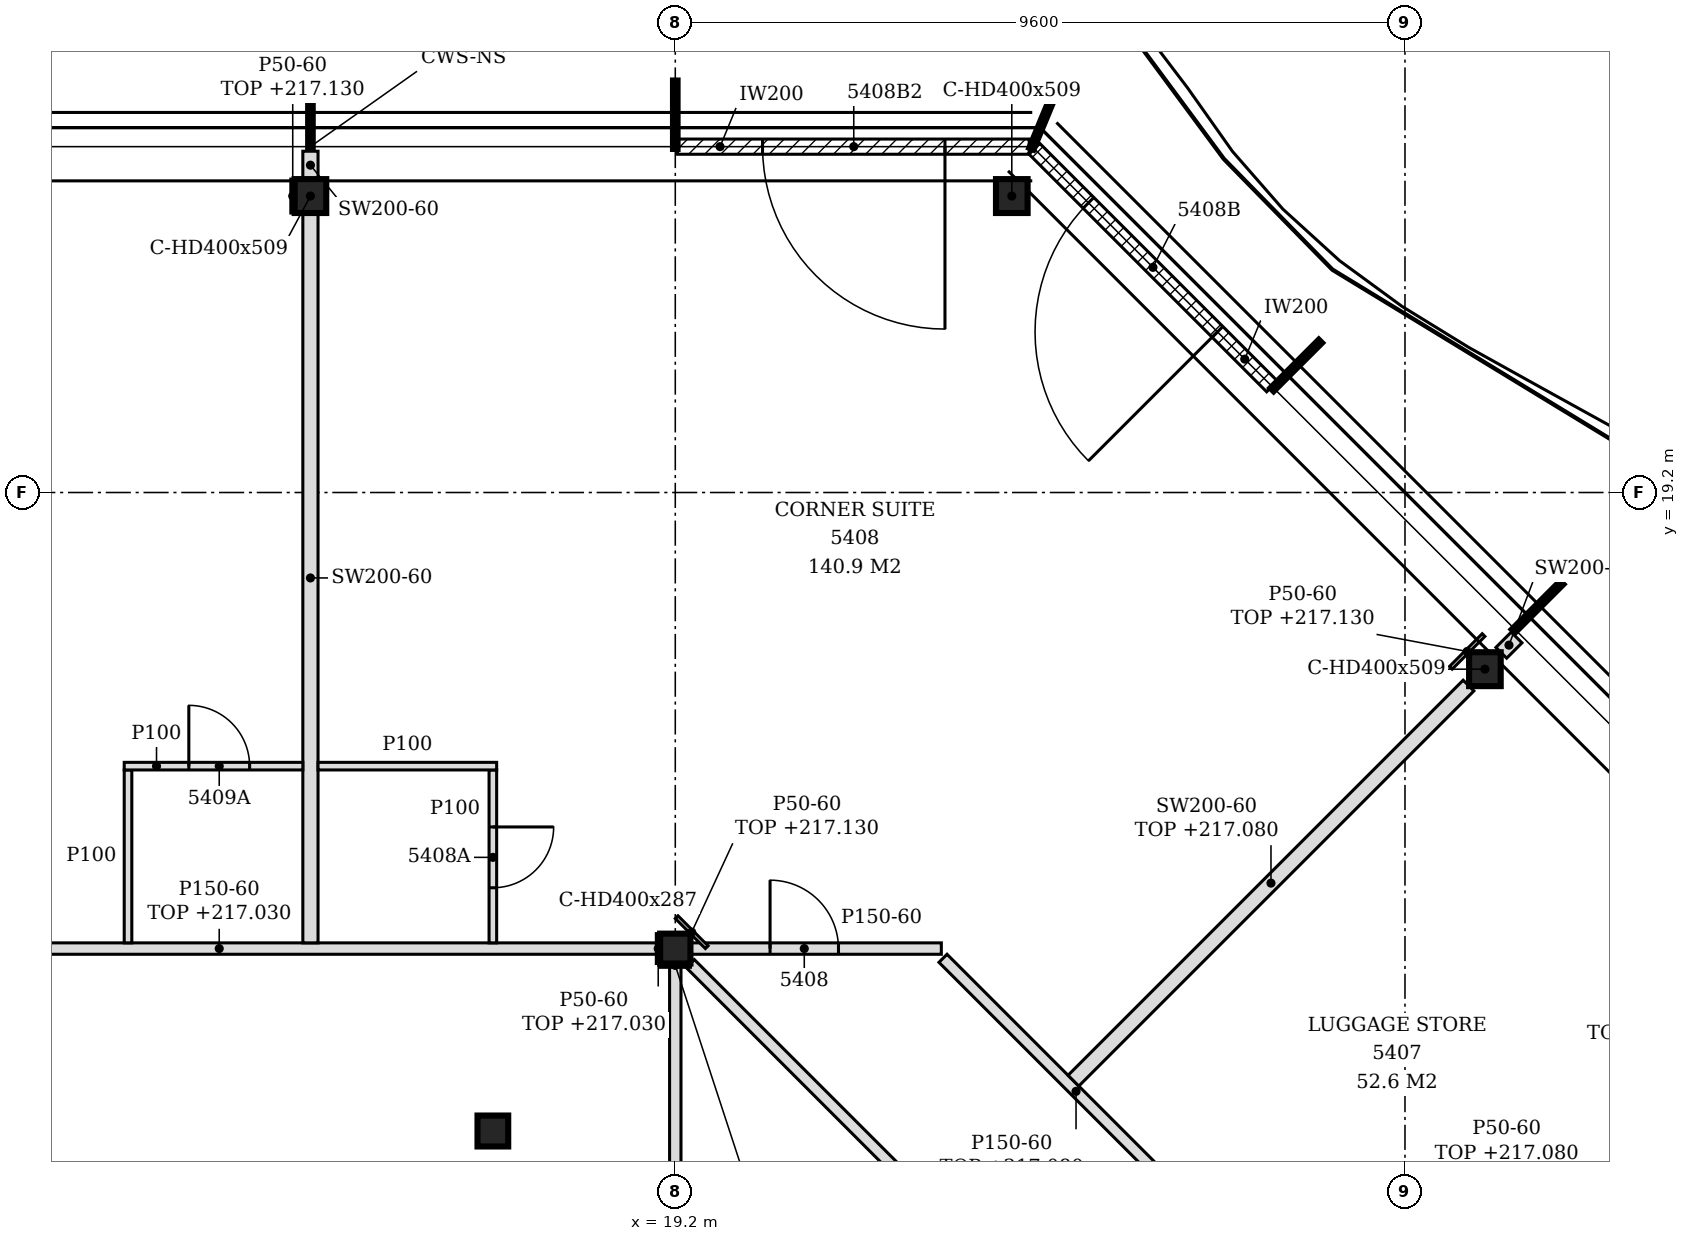
"""IFC4 building model, lengths in metres.
Left out: names, types, materials, properties, quantities, classifications, styles, units other than length and angle.
Written with IfcOpenShell. Run it as: python <this file> out.ifc"""

import sys

from ifc_helpers import new_model, si_unit, direction, frame, frame_2d, origin, origin_2d, place, context, subcontext, project, spatial, polyline, rectangle, i_section, outline, extrude, element, fill, save


model = new_model("IFC4")
c1 = context("Model", 3, precision=1e-05, world=origin(), true_north=direction((0.0, 1.0)))
c2 = subcontext(c1, "Body", "Model", "MODEL_VIEW")
j1 = project(units=[si_unit("LENGTHUNIT", "METRE"), si_unit("PLANEANGLEUNIT", "RADIAN")], contexts=[c1])
p1 = place(None, origin())
s1 = spatial("IfcSite", under=j1, at=p1, CompositionType="ELEMENT")
p2 = place(p1, origin())
s2 = spatial("IfcBuilding", under=s1, at=p2, CompositionType="ELEMENT")
p3 = place(p2, frame((0.0, 0.0, 214.2)))
s3 = spatial("IfcBuildingStorey", under=s2, at=p3, CompositionType="ELEMENT", Elevation=214.2)
for number, where, z_axis, x_axis in (
    (1, (29.852, 16.876, -0.15), (0.0, 0.0, 1.0), (1.0, 0.0, 0.0)),
    (2, (23.627, 23.1, -0.15), (0.0, 0.0, 1.0), (1.0, 0.0, 0.0)),
    (3, (14.4, 23.1, -0.15), (0.0, 0.0, 1.0), (1.0, 0.0, 0.0)),
):
    element("IfcColumn", number, at=place(p3, frame(where, z_axis=z_axis, x_axis=x_axis)), inside=s3, PredefinedType="COLUMN", context=c2, shape_type="SweptSolid", body=[
        extrude(i_section(OverallWidth=0.416, OverallDepth=0.446, WebThickness=0.039, FlangeThickness=0.063, FilletRadius=0.015, at=origin_2d()), origin(), (0.0, 0.0, 1.0), 3.6),
    ])
p4 = place(p3, frame((19.2, 13.2, -0.15), z_axis=(0.0, 0.0, 1.0), x_axis=(1.0, 0.0, 0.0)))
e4 = element("IfcColumn", 4, at=p4, inside=s3, PredefinedType="COLUMN", context=c2, shape_type="SweptSolid", body=[
    extrude(i_section(OverallWidth=0.399, OverallDepth=0.393, WebThickness=0.023, FlangeThickness=0.037, FilletRadius=0.015, at=origin_2d()), origin(), (0.0, 0.0, 1.0), 3.6),
])
p5 = place(p3, frame((16.8, 10.8, -0.15), z_axis=(0.0, 0.0, 1.0), x_axis=(1.0, 0.0, 0.0)))
e5 = element("IfcColumn", 5, at=p5, inside=s3, PredefinedType="COLUMN", context=c2, shape_type="SweptSolid", body=[
    extrude(i_section(OverallWidth=0.404, OverallDepth=0.407, WebThickness=0.027, FlangeThickness=0.044, FilletRadius=0.015, at=origin_2d()), origin(), (0.0, 0.0, 1.0), 3.6),
])
p6 = place(p3, frame((27.051, 20.596, 0.0), z_axis=(0.0, 0.0, 1.0), x_axis=(-0.707106781187, 0.707106781187, 0.0)))
e6 = element("IfcWall", 6, at=p6, inside=s3, PredefinedType="NOTDEFINED", context=c2, shape_type="SweptSolid", body=[
    extrude(rectangle(XDim=4.421, YDim=0.2, at=frame_2d((2.21, 0.0))), origin(), (0.0, 0.0, 1.0), 3.45),
])
p7 = place(p6, frame((1.015, 0.0, 0.0)))
e7 = element("IfcOpeningElement", 7, at=p7, cuts=e6, PredefinedType="OPENING", context=c2, shape_type="SweptSolid", body=[
    extrude(rectangle(XDim=2.4, YDim=2.4, at=frame_2d((1.2, 1.2))), frame((0.0, 0.11, 0.0), z_axis=(0.0, -1.0, 0.0), x_axis=(1.0, 0.0, 0.0)), (0.0, 0.0, 1.0), 0.22),
])
p8 = place(p3, frame((23.856, 23.75, 0.0), z_axis=(0.0, 0.0, 1.0), x_axis=(-1.0, 0.0, 0.0)))
e8 = element("IfcWall", 8, at=p8, inside=s3, PredefinedType="NOTDEFINED", context=c2, shape_type="SweptSolid", body=[
    extrude(rectangle(XDim=4.626, YDim=0.2, at=frame_2d((2.313, 0.0))), origin(), (0.0, 0.0, 1.0), 3.45),
])
p9 = place(p8, frame((1.108, 0.0, 0.0)))
e9 = element("IfcOpeningElement", 9, at=p9, cuts=e8, PredefinedType="OPENING", context=c2, shape_type="SweptSolid", body=[
    extrude(rectangle(XDim=2.4, YDim=2.4, at=frame_2d((1.2, 1.2))), frame((0.0, 0.11, 0.0), z_axis=(0.0, -1.0, 0.0), x_axis=(1.0, 0.0, 0.0)), (0.0, 0.0, 1.0), 0.22),
])
p10 = place(p3, frame((35.872, -0.078, 0.0), z_axis=(0.0, 0.0, 1.0), x_axis=(-0.707113345155, 0.707100217157, 0.0)))
e10 = element("IfcWall", 10, at=p10, inside=s3, PredefinedType="PARTITIONING", context=c2, shape_type="SweptSolid", body=[
    extrude(rectangle(XDim=18.597, YDim=0.15, at=frame_2d((9.298, 0.0))), origin(), (0.0, 0.0, 1.0), 2.88),
])
p11 = place(p10, frame((4.744, 0.0, 0.0)))
e11 = element("IfcOpeningElement", 11, at=p11, cuts=e10, PredefinedType="OPENING", context=c2, shape_type="SweptSolid", body=[
    extrude(rectangle(XDim=0.9, YDim=2.1, at=frame_2d((0.45, 1.05))), frame((0.0, 0.085, 0.0), z_axis=(0.0, -1.0, 0.0), x_axis=(1.0, 0.0, 0.0)), (0.0, 0.0, 1.0), 0.17),
])
p12 = place(p10, frame((8.345, 0.0, 0.0)))
e12 = element("IfcOpeningElement", 12, at=p12, cuts=e10, PredefinedType="OPENING", context=c2, shape_type="SweptSolid", body=[
    extrude(rectangle(XDim=0.9, YDim=2.1, at=frame_2d((0.45, 1.05))), frame((0.0, 0.085, 0.0), z_axis=(0.0, -1.0, 0.0), x_axis=(1.0, 0.0, 0.0)), (0.0, 0.0, 1.0), 0.17),
])
p13 = place(p10, frame((12.746, 0.0, 0.0)))
e13 = element("IfcOpeningElement", 13, at=p13, cuts=e10, PredefinedType="OPENING", context=c2, shape_type="SweptSolid", body=[
    extrude(rectangle(XDim=0.9, YDim=2.1, at=frame_2d((0.45, 1.05))), frame((0.0, 0.085, 0.0), z_axis=(0.0, -1.0, 0.0), x_axis=(1.0, 0.0, 0.0)), (0.0, 0.0, 1.0), 0.17),
])
p14 = place(p3, frame((32.272, 0.128, 0.0), z_axis=(0.0, 0.0, 1.0), x_axis=(-0.707106781187, 0.707106781187, 0.0)))
e14 = element("IfcWall", 14, at=p14, inside=s3, PredefinedType="PARTITIONING", context=c2, shape_type="SweptSolid", body=[
    extrude(rectangle(XDim=18.207, YDim=0.15, at=frame_2d((9.103, 0.0))), origin(), (0.0, 0.0, 1.0), 2.88),
])
p15 = place(p14, frame((8.703, 0.0, 0.0)))
e15 = element("IfcOpeningElement", 15, at=p15, cuts=e14, PredefinedType="OPENING", context=c2, shape_type="SweptSolid", body=[
    extrude(rectangle(XDim=0.9, YDim=2.1, at=frame_2d((0.45, 1.05))), frame((0.0, 0.085, 0.0), z_axis=(0.0, -1.0, 0.0), x_axis=(1.0, 0.0, 0.0)), (0.0, 0.0, 1.0), 0.17),
])
p16 = place(p3, frame((19.2, 2.596, 0.0), z_axis=(0.0, 0.0, 1.0), x_axis=(0.0, 1.0, 0.0)))
e16 = element("IfcWall", 16, at=p16, inside=s3, PredefinedType="PARTITIONING", context=c2, shape_type="SweptSolid", body=[
    extrude(rectangle(XDim=10.407, YDim=0.15, at=frame_2d((5.204, 0.0))), origin(), (0.0, 0.0, 1.0), 2.83),
])
p17 = place(p3, frame((30.662, 5.238, 0.0), z_axis=(0.0, 0.0, 1.0), x_axis=(0.707106781187, 0.707106781187, 0.0)))
e17 = element("IfcWall", 17, at=p17, inside=s3, PredefinedType="PARTITIONING", context=c2, shape_type="SweptSolid", body=[
    extrude(rectangle(XDim=7.351, YDim=0.2, at=frame_2d((3.676, 0.0))), origin(), (0.0, 0.0, 1.0), 2.93),
])
p18 = place(p3, frame((31.398, 9.798, 0.0), z_axis=(0.0, 0.0, 1.0), x_axis=(0.707133900936, 0.707079660397, 0.0)))
e18 = element("IfcWall", 18, at=p18, inside=s3, PredefinedType="PARTITIONING", context=c2, shape_type="SweptSolid", body=[
    extrude(rectangle(XDim=4.501, YDim=0.2, at=frame_2d((2.25, 0.0))), origin(), (0.0, 0.0, 1.0), 2.63),
])
p19 = place(p3, frame((24.438, 11.462, 0.0), z_axis=(0.0, 0.0, 1.0), x_axis=(0.707090175614, 0.707123386369, 0.0)))
e19 = element("IfcWall", 19, at=p19, inside=s3, PredefinedType="PARTITIONING", context=c2, shape_type="SweptSolid", body=[
    extrude(rectangle(XDim=7.351, YDim=0.2, at=frame_2d((3.676, 0.0))), origin(), (0.0, 0.0, 1.0), 2.88),
])
p20 = place(p3, frame((7.399, 13.2, 0.0), z_axis=(0.0, 0.0, 1.0), x_axis=(1.0, 0.0, 0.0)))
e20 = element("IfcWall", 20, at=p20, inside=s3, PredefinedType="PARTITIONING", context=c2, shape_type="SweptSolid", body=[
    extrude(rectangle(XDim=11.601, YDim=0.15, at=frame_2d((5.801, 0.0))), origin(), (0.0, 0.0, 1.0), 2.83),
])
p21 = place(p3, frame((19.399, 13.2, 0.0), z_axis=(0.0, 0.0, 1.0), x_axis=(1.0, 0.0, 0.0)))
e21 = element("IfcWall", 21, at=p21, inside=s3, PredefinedType="PARTITIONING", context=c2, shape_type="SweptSolid", body=[
    extrude(rectangle(XDim=3.301, YDim=0.15, at=frame_2d((1.65, 0.0))), origin(), (0.0, 0.0, 1.0), 3.45),
])
p22 = place(p21, frame((1.048, 0.0, 0.0)))
e22 = element("IfcOpeningElement", 22, at=p22, cuts=e21, PredefinedType="OPENING", context=c2, shape_type="SweptSolid", body=[
    extrude(rectangle(XDim=0.9, YDim=2.1, at=frame_2d((0.45, 1.05))), frame((0.0, 0.085, 0.0), z_axis=(0.0, -1.0, 0.0), x_axis=(1.0, 0.0, 0.0)), (0.0, 0.0, 1.0), 0.17),
])
p23 = place(p3, frame((12.0, 13.275, 0.0), z_axis=(0.0, 0.0, 1.0), x_axis=(0.0, 1.0, 0.0)))
e23 = element("IfcWall", 23, at=p23, inside=s3, PredefinedType="PARTITIONING", context=c2, shape_type="SweptSolid", body=[
    extrude(outline(polyline([(0.0, 0.0), (2.275, 0.0), (2.275, 3.45), (0.075, 3.45), (0.073, 2.83), (0.0, 2.83), (0.0, 0.0)])), frame((0.0, 0.05, 0.0), z_axis=(0.0, -1.0, 0.0), x_axis=(1.0, 0.0, 0.0)), (0.0, 0.0, 1.0), 0.1),
])
p24 = place(p3, frame((14.4, 13.275, 0.0), z_axis=(0.0, 0.0, 1.0), x_axis=(0.0, 1.0, 0.0)))
e24 = element("IfcWall", 24, at=p24, inside=s3, PredefinedType="PARTITIONING", context=c2, shape_type="SweptSolid", body=[
    extrude(outline(polyline([(0.0, 0.0), (9.602, 0.0), (9.602, 3.45), (6.03, 3.45), (6.028, 2.88), (5.82, 2.88), (5.818, 3.45), (0.075, 3.45), (0.073, 2.83), (0.0, 2.83), (0.0, 0.0)])), frame((0.0, 0.1, 0.0), z_axis=(0.0, -1.0, 0.0), x_axis=(1.0, 0.0, 0.0)), (0.0, 0.0, 1.0), 0.2),
])
p25 = place(p3, frame((16.8, 13.275, 0.0), z_axis=(0.0, 0.0, 1.0), x_axis=(0.0, 1.0, 0.0)))
e25 = element("IfcWall", 25, at=p25, inside=s3, PredefinedType="PARTITIONING", context=c2, shape_type="SweptSolid", body=[
    extrude(outline(polyline([(0.0, 0.0), (2.275, 0.0), (2.275, 3.45), (0.075, 3.45), (0.073, 2.83), (0.0, 2.83), (0.0, 0.0)])), frame((0.0, 0.05, 0.0), z_axis=(0.0, -1.0, 0.0), x_axis=(1.0, 0.0, 0.0)), (0.0, 0.0, 1.0), 0.1),
])
p26 = place(p25, frame((0.725, 0.0, 0.0)))
e26 = element("IfcOpeningElement", 26, at=p26, cuts=e25, PredefinedType="OPENING", context=c2, shape_type="SweptSolid", body=[
    extrude(rectangle(XDim=0.8, YDim=2.1, at=frame_2d((0.4, 1.05))), frame((0.0, 0.06, 0.0), z_axis=(0.0, -1.0, 0.0), x_axis=(1.0, 0.0, 0.0)), (0.0, 0.0, 1.0), 0.12),
])
p27 = place(p3, frame((11.95, 15.6, 0.0), z_axis=(0.0, 0.0, 1.0), x_axis=(1.0, 0.0, 0.0)))
e27 = element("IfcWall", 27, at=p27, inside=s3, PredefinedType="PARTITIONING", context=c2, shape_type="SweptSolid", body=[
    extrude(rectangle(XDim=2.35, YDim=0.1, at=frame_2d((1.175, 0.0))), origin(), (0.0, 0.0, 1.0), 3.45),
])
p28 = place(p27, frame((0.85, 0.0, 0.0)))
e28 = element("IfcOpeningElement", 28, at=p28, cuts=e27, PredefinedType="OPENING", context=c2, shape_type="SweptSolid", body=[
    extrude(rectangle(XDim=0.8, YDim=2.1, at=frame_2d((0.4, 1.05))), frame((0.0, 0.06, 0.0), z_axis=(0.0, -1.0, 0.0), x_axis=(1.0, 0.0, 0.0)), (0.0, 0.0, 1.0), 0.12),
])
p29 = place(p3, frame((14.5, 15.6, 0.0), z_axis=(0.0, 0.0, 1.0), x_axis=(1.0, 0.0, 0.0)))
e29 = element("IfcWall", 29, at=p29, inside=s3, PredefinedType="PARTITIONING", context=c2, shape_type="SweptSolid", body=[
    extrude(rectangle(XDim=2.35, YDim=0.1, at=frame_2d((1.175, 0.0))), origin(), (0.0, 0.0, 1.0), 3.45),
])
p30 = place(p3, frame((30.067, 17.091, 0.0), z_axis=(0.0, 0.0, 1.0), x_axis=(0.707106781187, 0.707106781187, 0.0)))
e30 = element("IfcWall", 30, at=p30, inside=s3, PredefinedType="PARTITIONING", context=c2, shape_type="SweptSolid", body=[
    extrude(rectangle(XDim=0.285, YDim=0.2, at=frame_2d((0.143, 0.0))), origin(), (0.0, 0.0, 1.0), 3.45),
])
p31 = place(p3, frame((14.4, 23.323, 0.0), z_axis=(0.0, 0.0, 1.0), x_axis=(0.0, 1.0, 0.0)))
e31 = element("IfcWall", 31, at=p31, inside=s3, PredefinedType="PARTITIONING", context=c2, shape_type="SweptSolid", body=[
    extrude(rectangle(XDim=0.367, YDim=0.2, at=frame_2d((0.184, 0.0))), origin(), (0.0, 0.0, 1.0), 3.45),
])
p32 = place(p3, frame((18.976, 13.003, 0.0), z_axis=(0.0, 0.0, 1.0), x_axis=(0.0, 1.0, 0.0)))
e32 = element("IfcWall", 32, at=p32, inside=s3, PredefinedType="PARTITIONING", context=c2, shape_type="SweptSolid", body=[
    extrude(rectangle(XDim=0.393, YDim=0.05, at=frame_2d((0.197, 0.0))), origin(), (0.0, 0.0, 1.0), 2.83),
])
p33 = place(p3, frame((19.614, 13.218, 0.0), z_axis=(0.0, 0.0, 1.0), x_axis=(-0.707106781187, 0.707106781187, 0.0)))
e33 = element("IfcWall", 33, at=p33, inside=s3, PredefinedType="PARTITIONING", context=c2, shape_type="SweptSolid", body=[
    extrude(rectangle(XDim=0.56, YDim=0.05, at=frame_2d((0.28, 0.0))), origin(), (0.0, 0.0, 1.0), 2.93),
])
p34 = place(p3, frame((29.403, 16.893, 0.0), z_axis=(0.0, 0.0, 1.0), x_axis=(0.706906496032, 0.707307009627, 0.0)))
e34 = element("IfcWall", 34, at=p34, inside=s3, PredefinedType="PARTITIONING", context=c2, shape_type="SweptSolid", body=[
    extrude(rectangle(XDim=0.61, YDim=0.05, at=frame_2d((0.305, 0.0))), origin(), (0.0, 0.0, 1.0), 2.93),
])
p35 = place(p3, frame((19.0, 12.979, 0.0), z_axis=(0.0, 0.0, 1.0), x_axis=(1.0, 0.0, 0.0)))
e35 = element("IfcWall", 35, at=p35, inside=s3, PredefinedType="PARTITIONING", context=c2, shape_type="SweptSolid", body=[
    extrude(rectangle(XDim=0.399, YDim=0.05, at=frame_2d((0.199, 0.0))), origin(), (0.0, 0.0, 1.0), 2.83),
])
p36 = place(p3, frame((14.167, 22.877, 0.0), z_axis=(0.0, 0.0, 1.0), x_axis=(0.0, 1.0, 0.0)))
e36 = element("IfcWall", 36, at=p36, inside=s3, PredefinedType="PARTITIONING", context=c2, shape_type="SweptSolid", body=[
    extrude(rectangle(XDim=0.446, YDim=0.05, at=frame_2d((0.223, 0.0))), origin(), (0.0, 0.0, 1.0), 2.93),
])
p37 = place(p7, origin())
e37 = element("IfcDoor", 37, at=p37, inside=s3, OperationType="SINGLE_SWING_LEFT", PredefinedType="DOOR", context=c2, shape_type="SweptSolid", body=[
    extrude(rectangle(XDim=2.4, YDim=2.4, at=frame_2d((1.2, 1.2))), frame((0.0, 0.025, 0.0), z_axis=(0.0, -1.0, 0.0), x_axis=(1.0, 0.0, 0.0)), (0.0, 0.0, 1.0), 0.05),
])
fill(e7, e37)
p38 = place(p9, origin())
e38 = element("IfcDoor", 38, at=p38, inside=s3, OperationType="SINGLE_SWING_LEFT", PredefinedType="DOOR", context=c2, shape_type="SweptSolid", body=[
    extrude(rectangle(XDim=2.4, YDim=2.4, at=frame_2d((1.2, 1.2))), frame((0.0, 0.025, 0.0), z_axis=(0.0, -1.0, 0.0), x_axis=(1.0, 0.0, 0.0)), (0.0, 0.0, 1.0), 0.05),
])
fill(e9, e38)
p39 = place(p22, origin())
e39 = element("IfcDoor", 39, at=p39, inside=s3, OperationType="SINGLE_SWING_LEFT", PredefinedType="DOOR", context=c2, shape_type="SweptSolid", body=[
    extrude(rectangle(XDim=0.9, YDim=2.1, at=frame_2d((0.45, 1.05))), frame((0.0, 0.025, 0.0), z_axis=(0.0, -1.0, 0.0), x_axis=(1.0, 0.0, 0.0)), (0.0, 0.0, 1.0), 0.05),
])
fill(e22, e39)
p40 = place(p26, frame((0.8, 0.0, 0.0), z_axis=(0.0, 0.0, 1.0), x_axis=(-1.0, 0.0, 0.0)))
e40 = element("IfcDoor", 40, at=p40, inside=s3, OperationType="SINGLE_SWING_LEFT", PredefinedType="DOOR", context=c2, shape_type="SweptSolid", body=[
    extrude(rectangle(XDim=0.8, YDim=2.1, at=frame_2d((0.4, 1.05))), frame((0.0, 0.025, 0.0), z_axis=(0.0, -1.0, 0.0), x_axis=(1.0, 0.0, 0.0)), (0.0, 0.0, 1.0), 0.05),
])
fill(e26, e40)
p41 = place(p28, origin())
e41 = element("IfcDoor", 41, at=p41, inside=s3, OperationType="SINGLE_SWING_LEFT", PredefinedType="DOOR", context=c2, shape_type="SweptSolid", body=[
    extrude(rectangle(XDim=0.8, YDim=2.1, at=frame_2d((0.4, 1.05))), frame((0.0, 0.025, 0.0), z_axis=(0.0, -1.0, 0.0), x_axis=(1.0, 0.0, 0.0)), (0.0, 0.0, 1.0), 0.05),
])
fill(e28, e41)
save(model, sys.argv[1])
